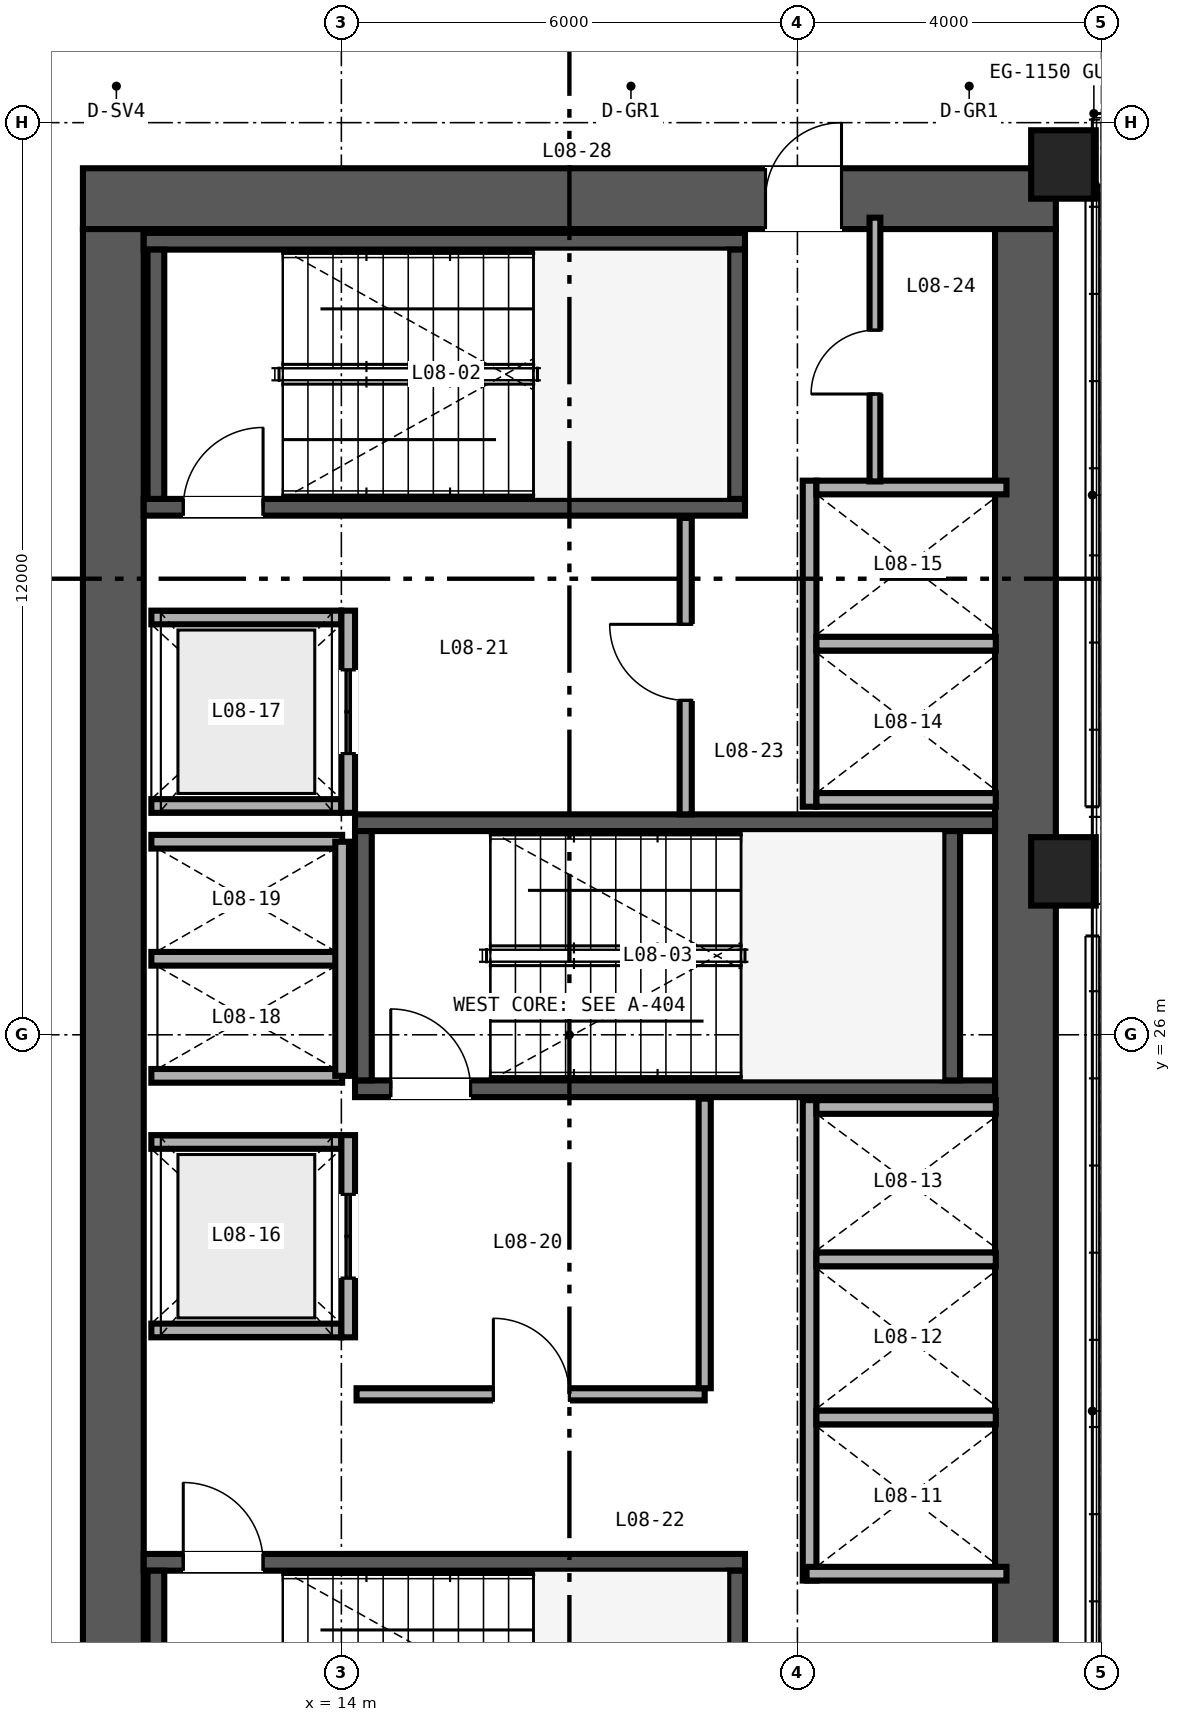
"""IFC4 building model, lengths in metres.
Left out: names, types, materials, properties, quantities, classifications, styles, units other than length and angle.
Written with IfcOpenShell. Run it as: python <this file> out.ifc"""

import sys

from ifc_helpers import new_model, si_unit, direction, frame, frame_2d, origin, origin_2d, place, context, subcontext, project, spatial, rectangle, hollow_rectangle, extrude, source, transform, mapped, element, fill, save


model = new_model("IFC4")
c1 = context("Model", 3, precision=1e-05, world=origin(), true_north=direction((0.0, 1.0)))
c2 = subcontext(c1, "Body", "Model", "MODEL_VIEW")
j1 = project(units=[si_unit("LENGTHUNIT", "METRE"), si_unit("PLANEANGLEUNIT", "RADIAN")], contexts=[c1])
p1 = place(None, origin())
s1 = spatial("IfcSite", under=j1, at=p1, CompositionType="ELEMENT")
p2 = place(p1, origin())
s2 = spatial("IfcBuilding", under=s1, at=p2, CompositionType="ELEMENT")
p3 = place(p2, frame((0.0, 0.0, 38.4)))
s3 = spatial("IfcBuildingStorey", under=s2, at=p3, CompositionType="ELEMENT", Elevation=38.4)
p4 = place(p3, frame((10.6, 37.0, 0.0), z_axis=(0.0, 0.0, 1.0), x_axis=(1.0, 0.0, 0.0)))
e1 = element("IfcWall", 1, at=p4, inside=s3, PredefinedType="SHEAR", context=c2, shape_type="SweptSolid", body=[
    extrude(rectangle(XDim=12.8, YDim=0.8, at=frame_2d((6.4, 0.0))), origin(), (0.0, 0.0, 1.0), 3.35),
])
p5 = place(p4, frame((8.98, 0.0, 0.0)))
e2 = element("IfcOpeningElement", 2, at=p5, cuts=e1, PredefinedType="OPENING", context=c2, shape_type="SweptSolid", body=[
    extrude(rectangle(XDim=1.0, YDim=2.15, at=frame_2d((0.5, 1.075))), frame((0.0, 0.41, 0.0), z_axis=(0.0, -1.0, 0.0), x_axis=(1.0, 0.0, 0.0)), (0.0, 0.0, 1.0), 0.82),
])
for number, where, z_axis, x_axis in (
    (3, (11.0, 15.4, 0.0), (0.0, 0.0, 1.0), (0.0, 1.0, 0.0)),
    (4, (23.0, 15.4, 0.0), (0.0, 0.0, 1.0), (0.0, 1.0, 0.0)),
):
    element("IfcWall", number, at=place(p3, frame(where, z_axis=z_axis, x_axis=x_axis)), inside=s3, PredefinedType="SHEAR", context=c2, shape_type="SweptSolid", body=[
        extrude(rectangle(XDim=21.2, YDim=0.8, at=frame_2d((10.6, 0.0))), origin(), (0.0, 0.0, 1.0), 3.35),
    ])
p6 = place(p3, frame((11.4, 19.06, 0.0), z_axis=(0.0, 0.0, 1.0), x_axis=(1.0, 0.0, 0.0)))
e5 = element("IfcWall", 5, at=p6, inside=s3, PredefinedType="SHEAR", context=c2, shape_type="SweptSolid", body=[
    extrude(rectangle(XDim=7.91, YDim=0.22, at=frame_2d((3.955, 0.0))), origin(), (0.0, 0.0, 1.0), 3.4),
])
p7 = place(p6, frame((0.52, 0.0, 0.0)))
e6 = element("IfcOpeningElement", 6, at=p7, cuts=e5, PredefinedType="OPENING", context=c2, shape_type="SweptSolid", body=[
    extrude(rectangle(XDim=1.05, YDim=2.15, at=frame_2d((0.525, 1.075))), frame((0.0, 0.12, 0.0), z_axis=(0.0, -1.0, 0.0), x_axis=(1.0, 0.0, 0.0)), (0.0, 0.0, 1.0), 0.24),
])
for number, where, z_axis, x_axis in (
    (7, (11.56, 15.67, 0.0), (0.0, 0.0, 1.0), (0.0, 1.0, 0.0)),
    (8, (19.2, 15.67, 0.0), (0.0, 0.0, 1.0), (0.0, 1.0, 0.0)),
):
    element("IfcWall", number, at=place(p3, frame(where, z_axis=z_axis, x_axis=x_axis)), inside=s3, PredefinedType="SHEAR", context=c2, shape_type="SweptSolid", body=[
        extrude(rectangle(XDim=3.28, YDim=0.22, at=frame_2d((1.64, 0.0))), origin(), (0.0, 0.0, 1.0), 3.4),
    ])
p8 = place(p3, frame((11.4, 32.94, 0.0), z_axis=(0.0, 0.0, 1.0), x_axis=(1.0, 0.0, 0.0)))
e9 = element("IfcWall", 9, at=p8, inside=s3, PredefinedType="SHEAR", context=c2, shape_type="SweptSolid", body=[
    extrude(rectangle(XDim=7.91, YDim=0.22, at=frame_2d((3.955, 0.0))), origin(), (0.0, 0.0, 1.0), 3.4),
])
p9 = place(p8, frame((0.52, 0.0, 0.0)))
e10 = element("IfcOpeningElement", 10, at=p9, cuts=e9, PredefinedType="OPENING", context=c2, shape_type="SweptSolid", body=[
    extrude(rectangle(XDim=1.05, YDim=2.15, at=frame_2d((0.525, 1.075))), frame((0.0, 0.12, 0.0), z_axis=(0.0, -1.0, 0.0), x_axis=(1.0, 0.0, 0.0)), (0.0, 0.0, 1.0), 0.24),
])
p10 = place(p3, frame((11.4, 36.44, 0.0), z_axis=(0.0, 0.0, 1.0), x_axis=(1.0, 0.0, 0.0)))
e11 = element("IfcWall", 11, at=p10, inside=s3, PredefinedType="SHEAR", context=c2, shape_type="SweptSolid", body=[
    extrude(rectangle(XDim=7.91, YDim=0.22, at=frame_2d((3.955, 0.0))), origin(), (0.0, 0.0, 1.0), 3.4),
])
for number, where, z_axis, x_axis in (
    (12, (11.56, 33.05, 0.0), (0.0, 0.0, 1.0), (0.0, 1.0, 0.0)),
    (13, (19.2, 33.05, 0.0), (0.0, 0.0, 1.0), (0.0, 1.0, 0.0)),
):
    element("IfcWall", number, at=place(p3, frame(where, z_axis=z_axis, x_axis=x_axis)), inside=s3, PredefinedType="SHEAR", context=c2, shape_type="SweptSolid", body=[
        extrude(rectangle(XDim=3.28, YDim=0.22, at=frame_2d((1.64, 0.0))), origin(), (0.0, 0.0, 1.0), 3.4),
    ])
p11 = place(p3, frame((14.18, 25.29, 0.0), z_axis=(0.0, 0.0, 1.0), x_axis=(1.0, 0.0, 0.0)))
e14 = element("IfcWall", 14, at=p11, inside=s3, PredefinedType="SHEAR", context=c2, shape_type="SweptSolid", body=[
    extrude(rectangle(XDim=8.42, YDim=0.22, at=frame_2d((4.21, 0.0))), origin(), (0.0, 0.0, 1.0), 3.4),
])
p12 = place(p11, frame((0.47, 0.0, 0.0)))
e15 = element("IfcOpeningElement", 15, at=p12, cuts=e14, PredefinedType="OPENING", context=c2, shape_type="SweptSolid", body=[
    extrude(rectangle(XDim=1.05, YDim=2.15, at=frame_2d((0.525, 1.075))), frame((0.0, 0.12, 0.0), z_axis=(0.0, -1.0, 0.0), x_axis=(1.0, 0.0, 0.0)), (0.0, 0.0, 1.0), 0.24),
])
p13 = place(p3, frame((14.18, 28.79, 0.0), z_axis=(0.0, 0.0, 1.0), x_axis=(1.0, 0.0, 0.0)))
e16 = element("IfcWall", 16, at=p13, inside=s3, PredefinedType="SHEAR", context=c2, shape_type="SweptSolid", body=[
    extrude(rectangle(XDim=8.42, YDim=0.22, at=frame_2d((4.21, 0.0))), origin(), (0.0, 0.0, 1.0), 3.4),
])
for number, where, z_axis, x_axis in (
    (17, (14.29, 25.4, 0.0), (0.0, 0.0, 1.0), (0.0, 1.0, 0.0)),
    (18, (22.03, 25.4, 0.0), (0.0, 0.0, 1.0), (0.0, 1.0, 0.0)),
):
    element("IfcWall", number, at=place(p3, frame(where, z_axis=z_axis, x_axis=x_axis)), inside=s3, PredefinedType="SHEAR", context=c2, shape_type="SweptSolid", body=[
        extrude(rectangle(XDim=3.28, YDim=0.22, at=frame_2d((1.64, 0.0))), origin(), (0.0, 0.0, 1.0), 3.4),
    ])
m1 = source(origin(), c2, "Body", "SweptSolid", [
    extrude(hollow_rectangle(XDim=0.85, YDim=0.9, WallThickness=0.04, at=origin_2d()), origin(), (0.0, 0.0, 1.0), 3.35),
])
for number, where, z_axis, x_axis in (
    (19, (23.5, 28.15, 0.0), (0.0, 0.0, 1.0), (1.0, 0.0, 0.0)),
    (20, (23.5, 37.45, 0.0), (0.0, 0.0, 1.0), (1.0, 0.0, 0.0)),
):
    element("IfcColumn", number, at=place(p3, frame(where, z_axis=z_axis, x_axis=x_axis)), inside=s3, PredefinedType="COLUMN", context=c2, shape_type="MappedRepresentation", body=[
        mapped(m1, transform((0.0, 0.0, 0.0), scale=1.0)),
    ])
p14 = place(p3, frame((20.16, 18.82, 0.0), z_axis=(0.0, 0.0, 1.0), x_axis=(0.0, 1.0, 0.0)))
e21 = element("IfcWall", 21, at=p14, inside=s3, PredefinedType="SOLIDWALL", context=c2, shape_type="SweptSolid", body=[
    extrude(rectangle(XDim=6.32, YDim=0.18, at=frame_2d((3.16, 0.0))), origin(), (0.0, 0.0, 1.0), 2.36),
])
p15 = place(p3, frame((20.12, 18.91, 0.0), z_axis=(0.0, 0.0, 1.0), x_axis=(1.0, 0.0, 0.0)))
e22 = element("IfcWall", 22, at=p15, inside=s3, PredefinedType="SOLIDWALL", context=c2, shape_type="SweptSolid", body=[
    extrude(rectangle(XDim=2.63, YDim=0.18, at=frame_2d((1.315, 0.0))), origin(), (0.0, 0.0, 1.0), 3.35),
])
p16 = place(p3, frame((20.25, 25.05, 0.0), z_axis=(0.0, 0.0, 1.0), x_axis=(1.0, 0.0, 0.0)))
e23 = element("IfcWall", 23, at=p16, inside=s3, PredefinedType="SOLIDWALL", context=c2, shape_type="SweptSolid", body=[
    extrude(rectangle(XDim=2.36, YDim=0.18, at=frame_2d((1.18, 0.0))), origin(), (0.0, 0.0, 1.0), 3.35),
])
p17 = place(p3, frame((20.25, 20.965, 0.0), z_axis=(0.0, 0.0, 1.0), x_axis=(1.0, 0.0, 0.0)))
e24 = element("IfcWall", 24, at=p17, inside=s3, PredefinedType="SOLIDWALL", context=c2, shape_type="SweptSolid", body=[
    extrude(rectangle(XDim=2.36, YDim=0.18, at=frame_2d((1.18, 0.0))), origin(), (0.0, 0.0, 1.0), 2.36),
])
p18 = place(p3, frame((20.25, 23.045, 0.0), z_axis=(0.0, 0.0, 1.0), x_axis=(1.0, 0.0, 0.0)))
e25 = element("IfcWall", 25, at=p18, inside=s3, PredefinedType="SOLIDWALL", context=c2, shape_type="SweptSolid", body=[
    extrude(rectangle(XDim=2.36, YDim=0.18, at=frame_2d((1.18, 0.0))), origin(), (0.0, 0.0, 1.0), 3.35),
])
p19 = place(p3, frame((20.16, 29.0, 0.0), z_axis=(0.0, 0.0, 1.0), x_axis=(0.0, 1.0, 0.0)))
e26 = element("IfcWall", 26, at=p19, inside=s3, PredefinedType="SOLIDWALL", context=c2, shape_type="SweptSolid", body=[
    extrude(rectangle(XDim=4.29, YDim=0.18, at=frame_2d((2.145, 0.0))), origin(), (0.0, 0.0, 1.0), 3.35),
])
p20 = place(p3, frame((20.25, 29.09, 0.0), z_axis=(0.0, 0.0, 1.0), x_axis=(1.0, 0.0, 0.0)))
e27 = element("IfcWall", 27, at=p20, inside=s3, PredefinedType="SOLIDWALL", context=c2, shape_type="SweptSolid", body=[
    extrude(rectangle(XDim=2.36, YDim=0.18, at=frame_2d((1.18, 0.0))), origin(), (0.0, 0.0, 1.0), 3.35),
])
p21 = place(p3, frame((20.25, 33.2, 0.0), z_axis=(0.0, 0.0, 1.0), x_axis=(1.0, 0.0, 0.0)))
e28 = element("IfcWall", 28, at=p21, inside=s3, PredefinedType="SOLIDWALL", context=c2, shape_type="SweptSolid", body=[
    extrude(rectangle(XDim=2.5, YDim=0.18, at=frame_2d((1.25, 0.0))), origin(), (0.0, 0.0, 1.0), 3.35),
])
p22 = place(p3, frame((20.25, 31.145, 0.0), z_axis=(0.0, 0.0, 1.0), x_axis=(1.0, 0.0, 0.0)))
e29 = element("IfcWall", 29, at=p22, inside=s3, PredefinedType="SOLIDWALL", context=c2, shape_type="SweptSolid", body=[
    extrude(rectangle(XDim=2.36, YDim=0.18, at=frame_2d((1.18, 0.0))), origin(), (0.0, 0.0, 1.0), 3.35),
])
for number, where, z_axis, x_axis in (
    (30, (11.5, 22.11, 0.0), (0.0, 0.0, 1.0), (1.0, 0.0, 0.0)),
    (31, (11.5, 24.59, 0.0), (0.0, 0.0, 1.0), (1.0, 0.0, 0.0)),
):
    element("IfcWall", number, at=place(p3, frame(where, z_axis=z_axis, x_axis=x_axis)), inside=s3, PredefinedType="SOLIDWALL", context=c2, shape_type="SweptSolid", body=[
        extrude(rectangle(XDim=2.5, YDim=0.18, at=frame_2d((1.25, 0.0))), origin(), (0.0, 0.0, 1.0), 3.35),
    ])
p23 = place(p3, frame((14.09, 22.02, 0.0), z_axis=(0.0, 0.0, 1.0), x_axis=(0.0, 1.0, 0.0)))
e32 = element("IfcWall", 32, at=p23, inside=s3, PredefinedType="SOLIDWALL", context=c2, shape_type="SweptSolid", body=[
    extrude(rectangle(XDim=2.66, YDim=0.18, at=frame_2d((1.33, 0.0))), origin(), (0.0, 0.0, 1.0), 3.35),
])
p24 = place(p23, frame((0.78, 0.0, 0.0)))
e33 = element("IfcOpeningElement", 33, at=p24, cuts=e32, PredefinedType="OPENING", context=c2, shape_type="SweptSolid", body=[
    extrude(rectangle(XDim=1.1, YDim=2.2, at=frame_2d((0.55, 1.1))), frame((0.0, 0.1, 0.0), z_axis=(0.0, -1.0, 0.0), x_axis=(1.0, 0.0, 0.0)), (0.0, 0.0, 1.0), 0.2),
])
for number, where, z_axis, x_axis in (
    (34, (11.5, 29.01, 0.0), (0.0, 0.0, 1.0), (1.0, 0.0, 0.0)),
    (35, (11.5, 31.49, 0.0), (0.0, 0.0, 1.0), (1.0, 0.0, 0.0)),
):
    element("IfcWall", number, at=place(p3, frame(where, z_axis=z_axis, x_axis=x_axis)), inside=s3, PredefinedType="SOLIDWALL", context=c2, shape_type="SweptSolid", body=[
        extrude(rectangle(XDim=2.5, YDim=0.18, at=frame_2d((1.25, 0.0))), origin(), (0.0, 0.0, 1.0), 3.35),
    ])
p25 = place(p3, frame((14.09, 28.92, 0.0), z_axis=(0.0, 0.0, 1.0), x_axis=(0.0, 1.0, 0.0)))
e36 = element("IfcWall", 36, at=p25, inside=s3, PredefinedType="SOLIDWALL", context=c2, shape_type="SweptSolid", body=[
    extrude(rectangle(XDim=2.66, YDim=0.18, at=frame_2d((1.33, 0.0))), origin(), (0.0, 0.0, 1.0), 3.35),
])
p26 = place(p25, frame((0.78, 0.0, 0.0)))
e37 = element("IfcOpeningElement", 37, at=p26, cuts=e36, PredefinedType="OPENING", context=c2, shape_type="SweptSolid", body=[
    extrude(rectangle(XDim=1.1, YDim=2.2, at=frame_2d((0.55, 1.1))), frame((0.0, 0.1, 0.0), z_axis=(0.0, -1.0, 0.0), x_axis=(1.0, 0.0, 0.0)), (0.0, 0.0, 1.0), 0.2),
])
for number, where, z_axis, x_axis in (
    (38, (11.5, 25.46, 0.0), (0.0, 0.0, 1.0), (1.0, 0.0, 0.0)),
    (39, (11.5, 27.0, 0.0), (0.0, 0.0, 1.0), (1.0, 0.0, 0.0)),
    (40, (11.5, 28.54, 0.0), (0.0, 0.0, 1.0), (1.0, 0.0, 0.0)),
):
    element("IfcWall", number, at=place(p3, frame(where, z_axis=z_axis, x_axis=x_axis)), inside=s3, PredefinedType="SOLIDWALL", context=c2, shape_type="SweptSolid", body=[
        extrude(rectangle(XDim=2.51, YDim=0.18, at=frame_2d((1.255, 0.0))), origin(), (0.0, 0.0, 1.0), 3.35),
    ])
p27 = place(p3, frame((14.01, 25.46, 0.0), z_axis=(0.0, 0.0, 1.0), x_axis=(0.0, 1.0, 0.0)))
e41 = element("IfcWall", 41, at=p27, inside=s3, PredefinedType="SOLIDWALL", context=c2, shape_type="SweptSolid", body=[
    extrude(rectangle(XDim=3.08, YDim=0.18, at=frame_2d((1.54, 0.0))), origin(), (0.0, 0.0, 1.0), 3.35),
])
p28 = place(p3, frame((14.2, 21.27, 0.0), z_axis=(0.0, 0.0, 1.0), x_axis=(1.0, 0.0, 0.0)))
e42 = element("IfcWall", 42, at=p28, inside=s3, PredefinedType="PARTITIONING", context=c2, shape_type="SweptSolid", body=[
    extrude(rectangle(XDim=4.58, YDim=0.16, at=frame_2d((2.29, 0.0))), origin(), (0.0, 0.0, 1.0), 3.35),
])
p29 = place(p28, frame((1.8, 0.0, 0.0)))
e43 = element("IfcOpeningElement", 43, at=p29, cuts=e42, PredefinedType="OPENING", context=c2, shape_type="SweptSolid", body=[
    extrude(rectangle(XDim=1.0, YDim=2.15, at=frame_2d((0.5, 1.075))), frame((0.0, 0.09, 0.0), z_axis=(0.0, -1.0, 0.0), x_axis=(1.0, 0.0, 0.0)), (0.0, 0.0, 1.0), 0.18),
])
p30 = place(p3, frame((18.78, 21.35, 0.0), z_axis=(0.0, 0.0, 1.0), x_axis=(0.0, 1.0, 0.0)))
e44 = element("IfcWall", 44, at=p30, inside=s3, PredefinedType="PARTITIONING", context=c2, shape_type="SweptSolid", body=[
    extrude(rectangle(XDim=3.81, YDim=0.16, at=frame_2d((1.905, 0.0))), origin(), (0.0, 0.0, 1.0), 3.35),
])
p31 = place(p3, frame((18.53, 28.9, 0.0), z_axis=(0.0, 0.0, 1.0), x_axis=(0.0, 1.0, 0.0)))
e45 = element("IfcWall", 45, at=p31, inside=s3, PredefinedType="PARTITIONING", context=c2, shape_type="SweptSolid", body=[
    extrude(rectangle(XDim=3.9, YDim=0.16, at=frame_2d((1.95, 0.0))), origin(), (0.0, 0.0, 1.0), 3.35),
])
p32 = place(p31, frame((1.5, 0.0, 0.0)))
e46 = element("IfcOpeningElement", 46, at=p32, cuts=e45, PredefinedType="OPENING", context=c2, shape_type="SweptSolid", body=[
    extrude(rectangle(XDim=1.0, YDim=2.15, at=frame_2d((0.5, 1.075))), frame((0.0, 0.09, 0.0), z_axis=(0.0, -1.0, 0.0), x_axis=(1.0, 0.0, 0.0)), (0.0, 0.0, 1.0), 0.18),
])
p33 = place(p3, frame((21.02, 33.28, 0.0), z_axis=(0.0, 0.0, 1.0), x_axis=(0.0, 1.0, 0.0)))
e47 = element("IfcWall", 47, at=p33, inside=s3, PredefinedType="PARTITIONING", context=c2, shape_type="SweptSolid", body=[
    extrude(rectangle(XDim=3.47, YDim=0.142, at=frame_2d((1.735, 0.0))), origin(), (0.0, 0.0, 1.0), 3.35),
])
p34 = place(p33, frame((1.15, 0.0, 0.0)))
e48 = element("IfcOpeningElement", 48, at=p34, cuts=e47, PredefinedType="OPENING", context=c2, shape_type="SweptSolid", body=[
    extrude(rectangle(XDim=0.84, YDim=2.1, at=frame_2d((0.42, 1.05))), frame((0.0, 0.081, 0.0), z_axis=(0.0, -1.0, 0.0), x_axis=(1.0, 0.0, 0.0)), (0.0, 0.0, 1.0), 0.162),
])
m2 = source(origin(), c2, "Body", "SweptSolid", [
    extrude(rectangle(XDim=1.05, YDim=2.15, at=frame_2d((0.525, 1.075))), frame((0.0, 0.025, 0.0), z_axis=(0.0, -1.0, 0.0), x_axis=(1.0, 0.0, 0.0)), (0.0, 0.0, 1.0), 0.05),
])
p35 = place(p7, origin())
e49 = element("IfcDoor", 49, at=p35, inside=s3, OperationType="SINGLE_SWING_LEFT", PredefinedType="DOOR", context=c2, shape_type="MappedRepresentation", body=[
    mapped(m2, transform((0.0, 0.0, 0.0), scale=1.0)),
])
fill(e6, e49)
p36 = place(p9, origin())
e50 = element("IfcDoor", 50, at=p36, inside=s3, OperationType="SINGLE_SWING_RIGHT", PredefinedType="DOOR", context=c2, shape_type="MappedRepresentation", body=[
    mapped(m2, transform((0.0, 0.0, 0.0), scale=1.0)),
])
fill(e10, e50)
p37 = place(p12, origin())
e51 = element("IfcDoor", 51, at=p37, inside=s3, OperationType="SINGLE_SWING_LEFT", PredefinedType="DOOR", context=c2, shape_type="MappedRepresentation", body=[
    mapped(m2, transform((0.0, 0.0, 0.0), scale=1.0)),
])
fill(e15, e51)
m3 = source(origin(), c2, "Body", "SweptSolid", [
    extrude(rectangle(XDim=1.1, YDim=2.2, at=frame_2d((0.55, 1.1))), frame((0.0, 0.025, 0.0), z_axis=(0.0, -1.0, 0.0), x_axis=(1.0, 0.0, 0.0)), (0.0, 0.0, 1.0), 0.05),
])
p38 = place(p24, origin())
e52 = element("IfcDoor", 52, at=p38, inside=s3, OperationType="DOUBLE_DOOR_SLIDING", PredefinedType="DOOR", context=c2, shape_type="MappedRepresentation", body=[
    mapped(m3, transform((0.0, 0.0, 0.0), scale=1.0)),
])
fill(e33, e52)
p39 = place(p26, origin())
e53 = element("IfcDoor", 53, at=p39, inside=s3, OperationType="DOUBLE_DOOR_SLIDING", PredefinedType="DOOR", context=c2, shape_type="MappedRepresentation", body=[
    mapped(m3, transform((0.0, 0.0, 0.0), scale=1.0)),
])
fill(e37, e53)
m4 = source(origin(), c2, "Body", "SweptSolid", [
    extrude(rectangle(XDim=1.0, YDim=2.15, at=frame_2d((0.5, 1.075))), frame((0.0, 0.025, 0.0), z_axis=(0.0, -1.0, 0.0), x_axis=(1.0, 0.0, 0.0)), (0.0, 0.0, 1.0), 0.05),
])
p40 = place(p29, origin())
e54 = element("IfcDoor", 54, at=p40, inside=s3, OperationType="SINGLE_SWING_LEFT", PredefinedType="DOOR", context=c2, shape_type="MappedRepresentation", body=[
    mapped(m4, transform((0.0, 0.0, 0.0), scale=1.0)),
])
fill(e43, e54)
p41 = place(p32, origin())
e55 = element("IfcDoor", 55, at=p41, inside=s3, OperationType="SINGLE_SWING_RIGHT", PredefinedType="DOOR", context=c2, shape_type="MappedRepresentation", body=[
    mapped(m4, transform((0.0, 0.0, 0.0), scale=1.0)),
])
fill(e46, e55)
m5 = source(origin(), c2, "Body", "SweptSolid", [
    extrude(rectangle(XDim=0.84, YDim=2.1, at=frame_2d((0.42, 1.05))), frame((0.0, 0.025, 0.0), z_axis=(0.0, -1.0, 0.0), x_axis=(1.0, 0.0, 0.0)), (0.0, 0.0, 1.0), 0.05),
])
p42 = place(p34, origin())
e56 = element("IfcDoor", 56, at=p42, inside=s3, OperationType="SINGLE_SWING_LEFT", PredefinedType="DOOR", context=c2, shape_type="MappedRepresentation", body=[
    mapped(m5, transform((0.0, 0.0, 0.0), scale=1.0)),
])
fill(e48, e56)
p43 = place(p5, origin())
e57 = element("IfcDoor", 57, at=p43, inside=s3, OperationType="SINGLE_SWING_RIGHT", PredefinedType="DOOR", context=c2, shape_type="MappedRepresentation", body=[
    mapped(m4, transform((0.0, 0.0, 0.0), scale=1.0)),
])
fill(e2, e57)
save(model, sys.argv[1])
